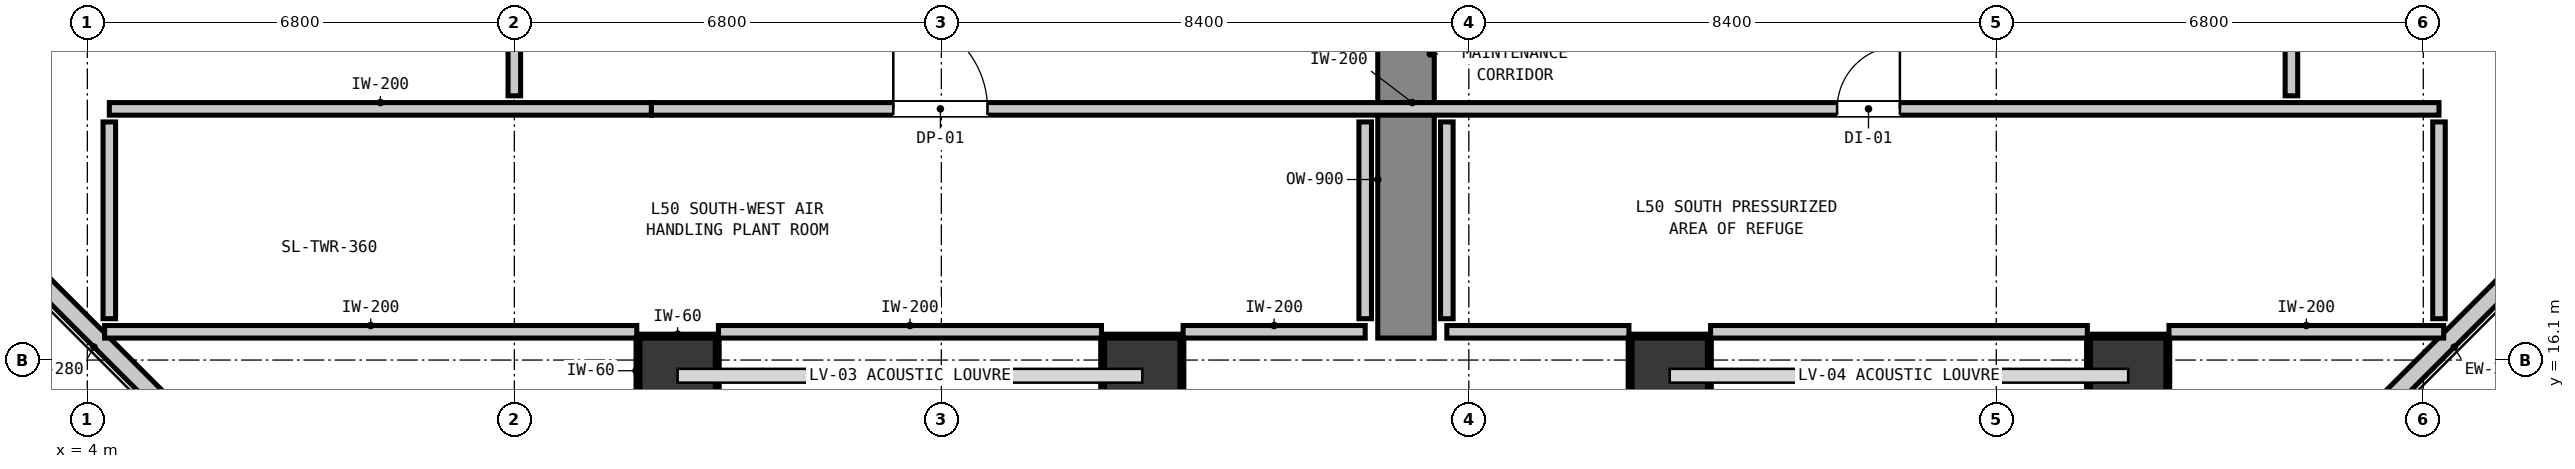
"""IFC4 building model, lengths in metres.
Left out: names, types, materials, properties, quantities, classifications, styles, units other than length and angle.
Written with IfcOpenShell. Run it as: python <this file> out.ifc"""

import sys

from ifc_helpers import new_model, si_unit, direction, frame, frame_2d, origin, origin_2d, place, context, subcontext, project, spatial, rectangle, extrude, element, fill, save


model = new_model("IFC4")
c1 = context("Model", 3, precision=1e-05, world=origin(), true_north=direction((0.0, 1.0)))
c2 = subcontext(c1, "Body", "Model", "MODEL_VIEW")
j1 = project(units=[si_unit("LENGTHUNIT", "METRE"), si_unit("PLANEANGLEUNIT", "RADIAN")], contexts=[c1])
p1 = place(None, origin())
s1 = spatial("IfcSite", under=j1, at=p1, CompositionType="ELEMENT")
p2 = place(p1, origin())
s2 = spatial("IfcBuilding", under=s1, at=p2, CompositionType="ELEMENT")
p3 = place(p2, frame((0.0, 0.0, 172.48)))
s3 = spatial("IfcBuildingStorey", under=s2, at=p3, CompositionType="ELEMENT", Elevation=172.48)
for number, where, z_axis, x_axis in (
    (1, (13.4, 15.85, 0.0), (0.0, 0.0, 1.0), (1.0, 0.0, 0.0)),
    (2, (20.8, 15.85, 0.0), (0.0, 0.0, 1.0), (1.0, 0.0, 0.0)),
    (3, (29.2, 15.85, 0.0), (0.0, 0.0, 1.0), (1.0, 0.0, 0.0)),
    (4, (36.5, 15.85, 0.0), (0.0, 0.0, 1.0), (1.0, 0.0, 0.0)),
):
    element("IfcColumn", number, at=place(p3, frame(where, z_axis=z_axis, x_axis=x_axis)), inside=s3, PredefinedType="COLUMN", context=c2, shape_type="SweptSolid", body=[
        extrude(rectangle(XDim=1.2, YDim=1.2, at=origin_2d()), origin(), (0.0, 0.0, 1.0), 4.4),
    ])
p4 = place(p3, frame((25.0, 16.45, 0.0), z_axis=(0.0, 0.0, 1.0), x_axis=(0.0, 1.0, 0.0)))
e5 = element("IfcWall", 5, at=p4, inside=s3, PredefinedType="SHEAR", context=c2, shape_type="SweptSolid", body=[
    extrude(rectangle(XDim=5.05, YDim=0.9, at=frame_2d((2.525, 0.0))), origin(), (0.0, 0.0, 1.0), 4.16),
])
for number, where, z_axis, x_axis in (
    (6, (42.745, 17.555, 0.0), (0.0, 0.0, 1.0), (-0.707, -0.707, 0.0)),
    (7, (5.355, 15.255, 0.0), (0.0, 0.0, 1.0), (-0.707, 0.707, 0.0)),
):
    element("IfcWall", number, at=place(p3, frame(where, z_axis=z_axis, x_axis=x_axis)), inside=s3, PredefinedType="STANDARD", context=c2, shape_type="SweptSolid", body=[
        extrude(rectangle(XDim=3.253, YDim=0.28, at=frame_2d((1.626, 0.0))), origin(), (0.0, 0.0, 1.0), 4.16),
    ])
p5 = place(p3, frame((4.275, 16.55, 0.0), z_axis=(0.0, 0.0, 1.0), x_axis=(1.0, 0.0, 0.0)))
e8 = element("IfcWall", 8, at=p5, inside=s3, PredefinedType="PARTITIONING", context=c2, shape_type="SweptSolid", body=[
    extrude(rectangle(XDim=8.475, YDim=0.2, at=frame_2d((4.238, 0.0))), origin(), (0.0, 0.0, 1.0), 3.645),
])
p6 = place(p3, frame((14.05, 16.55, 0.0), z_axis=(0.0, 0.0, 1.0), x_axis=(1.0, 0.0, 0.0)))
e9 = element("IfcWall", 9, at=p6, inside=s3, PredefinedType="PARTITIONING", context=c2, shape_type="SweptSolid", body=[
    extrude(rectangle(XDim=6.1, YDim=0.2, at=frame_2d((3.05, 0.0))), origin(), (0.0, 0.0, 1.0), 4.16),
])
for number, where, z_axis, x_axis in (
    (10, (21.45, 16.55, 0.0), (0.0, 0.0, 1.0), (1.0, 0.0, 0.0)),
    (11, (25.65, 16.55, 0.0), (0.0, 0.0, 1.0), (1.0, 0.0, 0.0)),
):
    element("IfcWall", number, at=place(p3, frame(where, z_axis=z_axis, x_axis=x_axis)), inside=s3, PredefinedType="PARTITIONING", context=c2, shape_type="SweptSolid", body=[
        extrude(rectangle(XDim=2.9, YDim=0.2, at=frame_2d((1.45, 0.0))), origin(), (0.0, 0.0, 1.0), 4.16),
    ])
p7 = place(p3, frame((29.85, 16.55, 0.0), z_axis=(0.0, 0.0, 1.0), x_axis=(1.0, 0.0, 0.0)))
e12 = element("IfcWall", 12, at=p7, inside=s3, PredefinedType="PARTITIONING", context=c2, shape_type="SweptSolid", body=[
    extrude(rectangle(XDim=6.0, YDim=0.2, at=frame_2d((3.0, 0.0))), origin(), (0.0, 0.0, 1.0), 4.16),
])
p8 = place(p3, frame((37.15, 16.55, 0.0), z_axis=(0.0, 0.0, 1.0), x_axis=(1.0, 0.0, 0.0)))
e13 = element("IfcWall", 13, at=p8, inside=s3, PredefinedType="PARTITIONING", context=c2, shape_type="SweptSolid", body=[
    extrude(rectangle(XDim=4.375, YDim=0.2, at=frame_2d((2.188, 0.0))), origin(), (0.0, 0.0, 1.0), 4.16),
])
p9 = place(p3, frame((4.35, 20.1, 0.0), z_axis=(0.0, 0.0, 1.0), x_axis=(1.0, 0.0, 0.0)))
e14 = element("IfcWall", 14, at=p9, inside=s3, PredefinedType="PARTITIONING", context=c2, shape_type="SweptSolid", body=[
    extrude(rectangle(XDim=8.633, YDim=0.2, at=frame_2d((4.316, 0.0))), origin(), (0.0, 0.0, 1.0), 3.645),
])
p10 = place(p3, frame((12.983, 20.1, 0.0), z_axis=(0.0, 0.0, 1.0), x_axis=(1.0, 0.0, 0.0)))
e15 = element("IfcWall", 15, at=p10, inside=s3, PredefinedType="PARTITIONING", context=c2, shape_type="SweptSolid", body=[
    extrude(rectangle(XDim=28.467, YDim=0.2, at=frame_2d((14.233, 0.0))), origin(), (0.0, 0.0, 1.0), 4.16),
])
p11 = place(p10, frame((18.882, 0.0, 0.0)))
e16 = element("IfcOpeningElement", 16, at=p11, cuts=e15, PredefinedType="OPENING", context=c2, shape_type="SweptSolid", body=[
    extrude(rectangle(XDim=1.0, YDim=2.15, at=frame_2d((0.5, 1.075))), frame((0.0, 0.11, 0.0), z_axis=(0.0, -1.0, 0.0), x_axis=(1.0, 0.0, 0.0)), (0.0, 0.0, 1.0), 0.22),
])
p12 = place(p10, frame((3.852, 0.0, 0.0)))
e17 = element("IfcOpeningElement", 17, at=p12, cuts=e15, PredefinedType="OPENING", context=c2, shape_type="SweptSolid", body=[
    extrude(rectangle(XDim=1.5, YDim=2.15, at=frame_2d((0.75, 1.075))), frame((0.0, 0.11, 0.0), z_axis=(0.0, -1.0, 0.0), x_axis=(1.0, 0.0, 0.0)), (0.0, 0.0, 1.0), 0.22),
])
p13 = place(p3, frame((4.35, 16.758, 0.0), z_axis=(0.0, 0.0, 1.0), x_axis=(0.0, 1.0, 0.0)))
e18 = element("IfcWall", 18, at=p13, inside=s3, PredefinedType="PARTITIONING", context=c2, shape_type="SweptSolid", body=[
    extrude(rectangle(XDim=3.134, YDim=0.2, at=frame_2d((1.567, 0.0))), origin(), (0.0, 0.0, 1.0), 4.16),
])
p14 = place(p3, frame((10.8, 20.308, 0.0), z_axis=(0.0, 0.0, 1.0), x_axis=(0.0, 1.0, 0.0)))
e19 = element("IfcWall", 19, at=p14, inside=s3, PredefinedType="PARTITIONING", context=c2, shape_type="SweptSolid", body=[
    extrude(rectangle(XDim=1.314, YDim=0.2, at=frame_2d((0.657, 0.0))), origin(), (0.0, 0.0, 1.0), 4.16),
])
for number, where, z_axis, x_axis in (
    (20, (24.35, 16.758, 0.0), (0.0, 0.0, 1.0), (0.0, 1.0, 0.0)),
    (21, (25.65, 16.758, 0.0), (0.0, 0.0, 1.0), (0.0, 1.0, 0.0)),
):
    element("IfcWall", number, at=place(p3, frame(where, z_axis=z_axis, x_axis=x_axis)), inside=s3, PredefinedType="PARTITIONING", context=c2, shape_type="SweptSolid", body=[
        extrude(rectangle(XDim=3.134, YDim=0.2, at=frame_2d((1.567, 0.0))), origin(), (0.0, 0.0, 1.0), 4.16),
    ])
p15 = place(p3, frame((39.1, 20.308, 0.0), z_axis=(0.0, 0.0, 1.0), x_axis=(0.0, 1.0, 0.0)))
e22 = element("IfcWall", 22, at=p15, inside=s3, PredefinedType="PARTITIONING", context=c2, shape_type="SweptSolid", body=[
    extrude(rectangle(XDim=1.314, YDim=0.2, at=frame_2d((0.657, 0.0))), origin(), (0.0, 0.0, 1.0), 4.16),
])
p16 = place(p3, frame((41.45, 16.758, 0.0), z_axis=(0.0, 0.0, 1.0), x_axis=(0.0, 1.0, 0.0)))
e23 = element("IfcWall", 23, at=p16, inside=s3, PredefinedType="PARTITIONING", context=c2, shape_type="SweptSolid", body=[
    extrude(rectangle(XDim=3.134, YDim=0.2, at=frame_2d((1.567, 0.0))), origin(), (0.0, 0.0, 1.0), 4.16),
])
p17 = place(p3, frame((12.8, 16.482, 0.0), z_axis=(0.0, 0.0, 1.0), x_axis=(1.0, 0.0, 0.0)))
e24 = element("IfcWall", 24, at=p17, inside=s3, PredefinedType="PARTITIONING", context=c2, shape_type="SweptSolid", body=[
    extrude(rectangle(XDim=1.2, YDim=0.06, at=frame_2d((0.6, 0.0))), origin(), (0.0, 0.0, 1.0), 1.45),
])
for number, where, z_axis, x_axis in (
    (25, (12.768, 15.41, 0.0), (0.0, 0.0, 1.0), (0.0, 1.0, 0.0)),
    (26, (14.032, 15.41, 0.0), (0.0, 0.0, 1.0), (0.0, 1.0, 0.0)),
):
    element("IfcWall", number, at=place(p3, frame(where, z_axis=z_axis, x_axis=x_axis)), inside=s3, PredefinedType="PARTITIONING", context=c2, shape_type="SweptSolid", body=[
        extrude(rectangle(XDim=1.04, YDim=0.06, at=frame_2d((0.52, 0.0))), origin(), (0.0, 0.0, 1.0), 1.45),
    ])
p18 = place(p3, frame((20.2, 16.482, 0.0), z_axis=(0.0, 0.0, 1.0), x_axis=(1.0, 0.0, 0.0)))
e27 = element("IfcWall", 27, at=p18, inside=s3, PredefinedType="PARTITIONING", context=c2, shape_type="SweptSolid", body=[
    extrude(rectangle(XDim=1.2, YDim=0.06, at=frame_2d((0.6, 0.0))), origin(), (0.0, 0.0, 1.0), 1.45),
])
for number, where, z_axis, x_axis in (
    (28, (20.168, 15.41, 0.0), (0.0, 0.0, 1.0), (0.0, 1.0, 0.0)),
    (29, (21.432, 15.41, 0.0), (0.0, 0.0, 1.0), (0.0, 1.0, 0.0)),
):
    element("IfcWall", number, at=place(p3, frame(where, z_axis=z_axis, x_axis=x_axis)), inside=s3, PredefinedType="PARTITIONING", context=c2, shape_type="SweptSolid", body=[
        extrude(rectangle(XDim=1.04, YDim=0.06, at=frame_2d((0.52, 0.0))), origin(), (0.0, 0.0, 1.0), 1.45),
    ])
p19 = place(p3, frame((28.6, 16.482, 0.0), z_axis=(0.0, 0.0, 1.0), x_axis=(1.0, 0.0, 0.0)))
e30 = element("IfcWall", 30, at=p19, inside=s3, PredefinedType="PARTITIONING", context=c2, shape_type="SweptSolid", body=[
    extrude(rectangle(XDim=1.2, YDim=0.06, at=frame_2d((0.6, 0.0))), origin(), (0.0, 0.0, 1.0), 1.45),
])
for number, where, z_axis, x_axis in (
    (31, (28.568, 15.41, 0.0), (0.0, 0.0, 1.0), (0.0, 1.0, 0.0)),
    (32, (29.832, 15.41, 0.0), (0.0, 0.0, 1.0), (0.0, 1.0, 0.0)),
):
    element("IfcWall", number, at=place(p3, frame(where, z_axis=z_axis, x_axis=x_axis)), inside=s3, PredefinedType="PARTITIONING", context=c2, shape_type="SweptSolid", body=[
        extrude(rectangle(XDim=1.04, YDim=0.06, at=frame_2d((0.52, 0.0))), origin(), (0.0, 0.0, 1.0), 1.45),
    ])
p20 = place(p3, frame((35.9, 16.482, 0.0), z_axis=(0.0, 0.0, 1.0), x_axis=(1.0, 0.0, 0.0)))
e33 = element("IfcWall", 33, at=p20, inside=s3, PredefinedType="PARTITIONING", context=c2, shape_type="SweptSolid", body=[
    extrude(rectangle(XDim=1.2, YDim=0.06, at=frame_2d((0.6, 0.0))), origin(), (0.0, 0.0, 1.0), 1.45),
])
for number, where, z_axis, x_axis in (
    (34, (35.868, 15.41, 0.0), (0.0, 0.0, 1.0), (0.0, 1.0, 0.0)),
    (35, (37.132, 15.41, 0.0), (0.0, 0.0, 1.0), (0.0, 1.0, 0.0)),
):
    element("IfcWall", number, at=place(p3, frame(where, z_axis=z_axis, x_axis=x_axis)), inside=s3, PredefinedType="PARTITIONING", context=c2, shape_type="SweptSolid", body=[
        extrude(rectangle(XDim=1.04, YDim=0.06, at=frame_2d((0.52, 0.0))), origin(), (0.0, 0.0, 1.0), 1.45),
    ])
p21 = place(p11, origin())
e36 = element("IfcDoor", 36, at=p21, inside=s3, OperationType="SINGLE_SWING_RIGHT", PredefinedType="DOOR", context=c2, shape_type="SweptSolid", body=[
    extrude(rectangle(XDim=1.0, YDim=2.15, at=frame_2d((0.5, 1.075))), frame((0.0, 0.025, 0.0), z_axis=(0.0, -1.0, 0.0), x_axis=(1.0, 0.0, 0.0)), (0.0, 0.0, 1.0), 0.05),
])
fill(e16, e36)
p22 = place(p12, origin())
e37 = element("IfcDoor", 37, at=p22, inside=s3, OperationType="SINGLE_SWING_LEFT", PredefinedType="DOOR", context=c2, shape_type="SweptSolid", body=[
    extrude(rectangle(XDim=1.5, YDim=2.15, at=frame_2d((0.75, 1.075))), frame((0.0, 0.025, 0.0), z_axis=(0.0, -1.0, 0.0), x_axis=(1.0, 0.0, 0.0)), (0.0, 0.0, 1.0), 0.05),
])
fill(e17, e37)
save(model, sys.argv[1])
